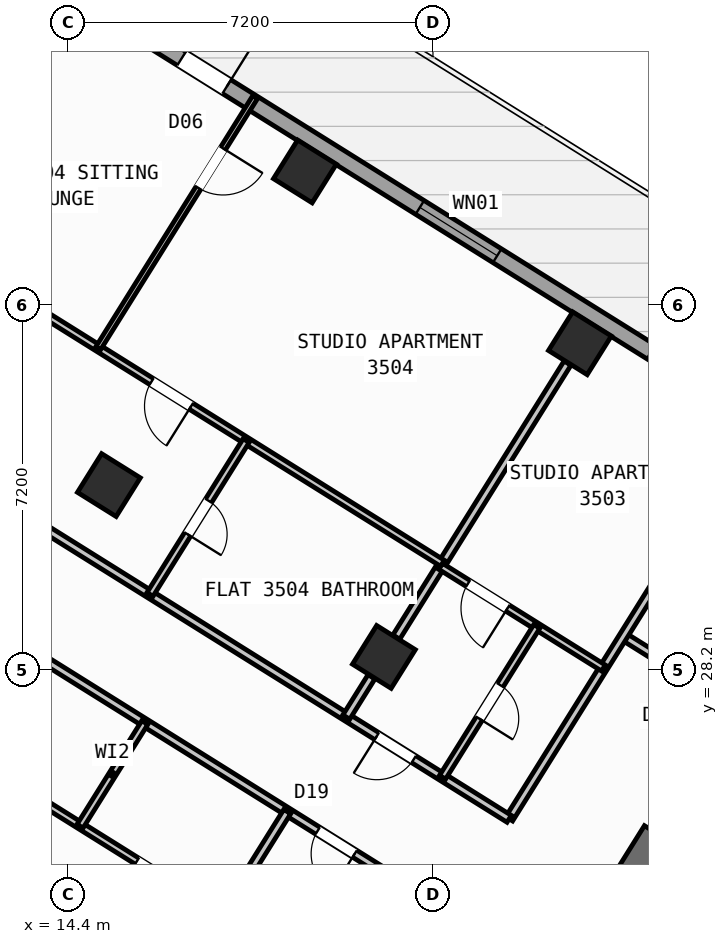
"""IFC4 building model, lengths in metres.
Left out: names, types, materials, properties, quantities, classifications, styles, units other than length and angle.
Written with IfcOpenShell. Run it as: python <this file> out.ifc"""

import sys

from ifc_helpers import new_model, si_unit, direction, frame, frame_2d, origin, origin_2d, place, context, subcontext, project, spatial, rectangle, hollow_rectangle, extrude, source, transform, mapped, element, fill, save


model = new_model("IFC4")
c1 = context("Model", 3, precision=1e-05, world=origin(), true_north=direction((0.0, 1.0)))
c2 = subcontext(c1, "Body", "Model", "MODEL_VIEW")
j1 = project(units=[si_unit("LENGTHUNIT", "METRE"), si_unit("PLANEANGLEUNIT", "RADIAN")], contexts=[c1])
p1 = place(None, origin())
s1 = spatial("IfcSite", under=j1, at=p1, CompositionType="ELEMENT")
p2 = place(p1, origin())
s2 = spatial("IfcBuilding", under=s1, at=p2, CompositionType="ELEMENT")
p3 = place(p2, frame((0.0, 0.0, 140.7)))
s3 = spatial("IfcBuildingStorey", under=s2, at=p3, CompositionType="ELEMENT", Elevation=140.7)
p4 = place(p3, frame((26.007, 24.976, 0.0), z_axis=(0.0, 0.0, 1.0), x_axis=(-0.529923795287, -0.848045264823, 0.0)))
e1 = element("IfcWall", 1, at=p4, inside=s3, PredefinedType="SHEAR", context=c2, shape_type="SweptSolid", body=[
    extrude(rectangle(XDim=6.425, YDim=0.55, at=frame_2d((3.212, 0.0))), origin(), (0.0, 0.0, 1.0), 3.35),
])
m1 = source(origin(), c2, "Body", "SweptSolid", [
    extrude(hollow_rectangle(XDim=0.9, YDim=0.9, WallThickness=0.036, at=origin_2d()), origin(), (0.0, 0.0, 1.0), 3.6),
])
for number, where, z_axis, x_axis in (
    (2, (24.5, 34.643, 0.0), (0.0, 0.0, 1.0), (-0.848, 0.53, 0.0)),
    (3, (20.632, 28.452, 0.0), (0.0, 0.0, 1.0), (-0.848, 0.53, 0.0)),
    (4, (19.073, 38.034, 0.0), (0.0, 0.0, 1.0), (-0.848, 0.53, 0.0)),
    (5, (15.205, 31.844, 0.0), (0.0, 0.0, 1.0), (-0.848, 0.53, 0.0)),
):
    element("IfcColumn", number, at=place(p3, frame(where, z_axis=z_axis, x_axis=x_axis)), inside=s3, PredefinedType="COLUMN", context=c2, shape_type="MappedRepresentation", body=[
        mapped(m1, transform((0.0, 0.0, 0.0), scale=1.0)),
    ])
p5 = place(p3, frame((14.138, 41.825, 0.0), z_axis=(0.0, 0.0, 1.0), x_axis=(0.848046498049, -0.529921821731, 0.0)))
e6 = element("IfcWall", 6, at=p5, inside=s3, PredefinedType="STANDARD", context=c2, shape_type="SweptSolid", body=[
    extrude(rectangle(XDim=31.588, YDim=0.32, at=frame_2d((15.794, 0.0))), origin(), (0.0, 0.0, 1.0), 3.35),
])
p6 = place(p5, frame((2.949, 0.0, 0.0)))
e7 = element("IfcOpeningElement", 7, at=p6, cuts=e6, PredefinedType="OPENING", context=c2, shape_type="SweptSolid", body=[
    extrude(rectangle(XDim=1.05, YDim=2.15, at=frame_2d((0.525, 1.075))), frame((0.0, 0.17, 0.0), z_axis=(0.0, -1.0, 0.0), x_axis=(1.0, 0.0, 0.0)), (0.0, 0.0, 1.0), 0.34),
])
p7 = place(p5, frame((0.861, 0.0, 0.85)))
e8 = element("IfcOpeningElement", 8, at=p7, cuts=e6, PredefinedType="OPENING", context=c2, shape_type="SweptSolid", body=[
    extrude(rectangle(XDim=1.5, YDim=1.5, at=frame_2d((0.75, 0.75))), frame((0.0, 0.17, 0.0), z_axis=(0.0, -1.0, 0.0), x_axis=(1.0, 0.0, 0.0)), (0.0, 0.0, 1.0), 0.34),
])
p8 = place(p5, frame((8.494, 0.0, 0.85)))
e9 = element("IfcOpeningElement", 9, at=p8, cuts=e6, PredefinedType="OPENING", context=c2, shape_type="SweptSolid", body=[
    extrude(rectangle(XDim=1.8, YDim=1.5, at=frame_2d((0.9, 0.75))), frame((0.0, 0.17, 0.0), z_axis=(0.0, -1.0, 0.0), x_axis=(1.0, 0.0, 0.0)), (0.0, 0.0, 1.0), 0.34),
])
p9 = place(p5, frame((13.874, 0.0, 0.85)))
e10 = element("IfcOpeningElement", 10, at=p9, cuts=e6, PredefinedType="OPENING", context=c2, shape_type="SweptSolid", body=[
    extrude(rectangle(XDim=1.5, YDim=1.5, at=frame_2d((0.75, 0.75))), frame((0.0, 0.17, 0.0), z_axis=(0.0, -1.0, 0.0), x_axis=(1.0, 0.0, 0.0)), (0.0, 0.0, 1.0), 0.34),
])
p10 = place(p5, frame((17.104, 0.0, 1.0)))
e11 = element("IfcOpeningElement", 11, at=p10, cuts=e6, PredefinedType="OPENING", context=c2, shape_type="SweptSolid", body=[
    extrude(rectangle(XDim=0.9, YDim=1.25, at=frame_2d((0.45, 0.625))), frame((0.0, 0.17, 0.0), z_axis=(0.0, -1.0, 0.0), x_axis=(1.0, 0.0, 0.0)), (0.0, 0.0, 1.0), 0.34),
])
p11 = place(p5, frame((22.144, 0.0, 1.0)))
e12 = element("IfcOpeningElement", 12, at=p11, cuts=e6, PredefinedType="OPENING", context=c2, shape_type="SweptSolid", body=[
    extrude(rectangle(XDim=0.9, YDim=1.25, at=frame_2d((0.45, 0.625))), frame((0.0, 0.17, 0.0), z_axis=(0.0, -1.0, 0.0), x_axis=(1.0, 0.0, 0.0)), (0.0, 0.0, 1.0), 0.34),
])
p12 = place(p5, frame((27.744, 0.0, 1.0)))
e13 = element("IfcOpeningElement", 13, at=p12, cuts=e6, PredefinedType="OPENING", context=c2, shape_type="SweptSolid", body=[
    extrude(rectangle(XDim=0.9, YDim=1.25, at=frame_2d((0.45, 0.625))), frame((0.0, 0.17, 0.0), z_axis=(0.0, -1.0, 0.0), x_axis=(1.0, 0.0, 0.0)), (0.0, 0.0, 1.0), 0.34),
])
p13 = place(p3, frame((27.57, 27.478, 0.0), z_axis=(0.0, 0.0, 1.0), x_axis=(-0.848050851465, 0.529914854792, 0.0)))
e14 = element("IfcWall", 14, at=p13, inside=s3, PredefinedType="PARTITIONING", context=c2, shape_type="SweptSolid", body=[
    extrude(rectangle(XDim=2.61, YDim=0.16, at=frame_2d((1.305, 0.0))), origin(), (0.0, 0.0, 1.0), 3.34),
])
p14 = place(p13, frame((0.95, 0.0, 0.0)))
e15 = element("IfcOpeningElement", 15, at=p14, cuts=e14, PredefinedType="OPENING", context=c2, shape_type="SweptSolid", body=[
    extrude(rectangle(XDim=0.86, YDim=2.05, at=frame_2d((0.43, 1.025))), frame((0.0, 0.09, 0.0), z_axis=(0.0, -1.0, 0.0), x_axis=(1.0, 0.0, 0.0)), (0.0, 0.0, 1.0), 0.18),
])
p15 = place(p3, frame((27.953, 33.016, 0.0), z_axis=(0.0, 0.0, 1.0), x_axis=(-0.529903001606, -0.848058257957, 0.0)))
e16 = element("IfcWall", 16, at=p15, inside=s3, PredefinedType="PARTITIONING", context=c2, shape_type="SweptSolid", body=[
    extrude(rectangle(XDim=9.15, YDim=0.16, at=frame_2d((4.575, 0.0))), origin(), (0.0, 0.0, 1.0), 3.34),
])
p16 = place(p3, frame((23.104, 25.256, 0.0), z_axis=(0.0, 0.0, 1.0), x_axis=(-0.848041752158, 0.529929416617, 0.0)))
e17 = element("IfcWall", 17, at=p16, inside=s3, PredefinedType="PARTITIONING", context=c2, shape_type="SweptSolid", body=[
    extrude(rectangle(XDim=16.73, YDim=0.16, at=frame_2d((8.365, 0.0))), origin(), (0.0, 0.0, 1.0), 3.34),
])
p17 = place(p16, frame((2.22, 0.0, 0.0)))
e18 = element("IfcOpeningElement", 18, at=p17, cuts=e17, PredefinedType="OPENING", context=c2, shape_type="SweptSolid", body=[
    extrude(rectangle(XDim=0.86, YDim=2.05, at=frame_2d((0.43, 1.025))), frame((0.0, 0.09, 0.0), z_axis=(0.0, -1.0, 0.0), x_axis=(1.0, 0.0, 0.0)), (0.0, 0.0, 1.0), 0.18),
])
p18 = place(p16, frame((12.084, 0.0, 0.0)))
e19 = element("IfcOpeningElement", 19, at=p18, cuts=e17, PredefinedType="OPENING", context=c2, shape_type="SweptSolid", body=[
    extrude(rectangle(XDim=1.0, YDim=2.1, at=frame_2d((0.5, 1.05))), frame((0.0, 0.09, 0.0), z_axis=(0.0, -1.0, 0.0), x_axis=(1.0, 0.0, 0.0)), (0.0, 0.0, 1.0), 0.18),
])
p19 = place(p3, frame((21.938, 23.391, 0.0), z_axis=(0.0, 0.0, 1.0), x_axis=(-0.848045850158, 0.529922858565, 0.0)))
e20 = element("IfcWall", 20, at=p19, inside=s3, PredefinedType="PARTITIONING", context=c2, shape_type="SweptSolid", body=[
    extrude(rectangle(XDim=16.73, YDim=0.16, at=frame_2d((8.365, 0.0))), origin(), (0.0, 0.0, 1.0), 3.34),
])
p20 = place(p19, frame((2.22, 0.0, 0.0)))
e21 = element("IfcOpeningElement", 21, at=p20, cuts=e20, PredefinedType="OPENING", context=c2, shape_type="SweptSolid", body=[
    extrude(rectangle(XDim=0.86, YDim=2.05, at=frame_2d((0.43, 1.025))), frame((0.0, 0.09, 0.0), z_axis=(0.0, -1.0, 0.0), x_axis=(1.0, 0.0, 0.0)), (0.0, 0.0, 1.0), 0.18),
])
p21 = place(p19, frame((14.22, 0.0, 0.0)))
e22 = element("IfcOpeningElement", 22, at=p21, cuts=e20, PredefinedType="OPENING", context=c2, shape_type="SweptSolid", body=[
    extrude(rectangle(XDim=1.0, YDim=2.1, at=frame_2d((0.5, 1.05))), frame((0.0, 0.09, 0.0), z_axis=(0.0, -1.0, 0.0), x_axis=(1.0, 0.0, 0.0)), (0.0, 0.0, 1.0), 0.18),
])
p22 = place(p3, frame((18.724, 25.399, 0.0), z_axis=(0.0, 0.0, 1.0), x_axis=(-0.529890499457, -0.848066069705, 0.0)))
e23 = element("IfcWall", 23, at=p22, inside=s3, PredefinedType="PARTITIONING", context=c2, shape_type="SweptSolid", body=[
    extrude(rectangle(XDim=3.238, YDim=0.16, at=frame_2d((1.619, 0.0))), origin(), (0.0, 0.0, 1.0), 2.775),
])
p23 = place(p3, frame((17.452, 23.364, 0.0), z_axis=(0.0, 0.0, 1.0), x_axis=(-0.848044326704, 0.52992529657, 0.0)))
e24 = element("IfcWall", 24, at=p23, inside=s3, PredefinedType="PLUMBINGWALL", context=c2, shape_type="SweptSolid", body=[
    extrude(rectangle(XDim=8.94, YDim=0.14, at=frame_2d((4.47, 0.0))), origin(), (0.0, 0.0, 1.0), 3.34),
])
p24 = place(p23, frame((5.087, 0.0, 0.0)))
e25 = element("IfcOpeningElement", 25, at=p24, cuts=e24, PredefinedType="OPENING", context=c2, shape_type="SweptSolid", body=[
    extrude(rectangle(XDim=0.78, YDim=2.05, at=frame_2d((0.39, 1.025))), frame((0.0, 0.08, 0.0), z_axis=(0.0, -1.0, 0.0), x_axis=(1.0, 0.0, 0.0)), (0.0, 0.0, 1.0), 0.16),
])
p25 = place(p23, frame((1.218, 0.0, 0.0)))
e26 = element("IfcOpeningElement", 26, at=p25, cuts=e24, PredefinedType="OPENING", context=c2, shape_type="SweptSolid", body=[
    extrude(rectangle(XDim=0.78, YDim=2.05, at=frame_2d((0.39, 1.025))), frame((0.0, 0.08, 0.0), z_axis=(0.0, -1.0, 0.0), x_axis=(1.0, 0.0, 0.0)), (0.0, 0.0, 1.0), 0.16),
])
p26 = place(p3, frame((15.913, 27.156, 0.0), z_axis=(0.0, 0.0, 1.0), x_axis=(-0.529935194983, -0.848038141311, 0.0)))
e27 = element("IfcWall", 27, at=p26, inside=s3, PredefinedType="PLUMBINGWALL", context=c2, shape_type="SweptSolid", body=[
    extrude(rectangle(XDim=2.41, YDim=0.14, at=frame_2d((1.205, 0.0))), origin(), (0.0, 0.0, 1.0), 3.34),
])
p27 = place(p3, frame((16.403, 21.685, 0.0), z_axis=(0.0, 0.0, 1.0), x_axis=(-0.848044326704, 0.52992529657, 0.0)))
e28 = element("IfcWall", 28, at=p27, inside=s3, PredefinedType="PARTITIONING", context=c2, shape_type="SweptSolid", body=[
    extrude(rectangle(XDim=8.94, YDim=0.11, at=frame_2d((4.47, 0.0))), origin(), (0.0, 0.0, 1.0), 3.34),
])
p28 = place(p27, frame((0.657, 0.0, 0.0)))
e29 = element("IfcOpeningElement", 29, at=p28, cuts=e28, PredefinedType="OPENING", context=c2, shape_type="SweptSolid", body=[
    extrude(rectangle(XDim=0.92, YDim=2.08, at=frame_2d((0.46, 1.04))), frame((0.0, 0.065, 0.0), z_axis=(0.0, -1.0, 0.0), x_axis=(1.0, 0.0, 0.0)), (0.0, 0.0, 1.0), 0.13),
])
p29 = place(p27, frame((2.893, 0.0, 0.0)))
e30 = element("IfcOpeningElement", 30, at=p29, cuts=e28, PredefinedType="OPENING", context=c2, shape_type="SweptSolid", body=[
    extrude(rectangle(XDim=0.92, YDim=2.08, at=frame_2d((0.46, 1.04))), frame((0.0, 0.065, 0.0), z_axis=(0.0, -1.0, 0.0), x_axis=(1.0, 0.0, 0.0)), (0.0, 0.0, 1.0), 0.13),
])
p30 = place(p27, frame((5.008, 0.0, 0.0)))
e31 = element("IfcOpeningElement", 31, at=p30, cuts=e28, PredefinedType="OPENING", context=c2, shape_type="SweptSolid", body=[
    extrude(rectangle(XDim=0.92, YDim=2.08, at=frame_2d((0.46, 1.04))), frame((0.0, 0.065, 0.0), z_axis=(0.0, -1.0, 0.0), x_axis=(1.0, 0.0, 0.0)), (0.0, 0.0, 1.0), 0.13),
])
p31 = place(p27, frame((7.363, 0.0, 0.0)))
e32 = element("IfcOpeningElement", 32, at=p31, cuts=e28, PredefinedType="OPENING", context=c2, shape_type="SweptSolid", body=[
    extrude(rectangle(XDim=0.92, YDim=2.08, at=frame_2d((0.46, 1.04))), frame((0.0, 0.065, 0.0), z_axis=(0.0, -1.0, 0.0), x_axis=(1.0, 0.0, 0.0)), (0.0, 0.0, 1.0), 0.13),
])
p32 = place(p3, frame((24.256, 34.251, 0.0), z_axis=(0.0, 0.0, 1.0), x_axis=(-0.529919772691, -0.848047778437, 0.0)))
e33 = element("IfcWall", 33, at=p32, inside=s3, PredefinedType="PARTITIONING", context=c2, shape_type="SweptSolid", body=[
    extrude(rectangle(XDim=6.376, YDim=0.16, at=frame_2d((3.188, 0.0))), origin(), (0.0, 0.0, 1.0), 2.775),
])
p33 = place(p3, frame((20.387, 28.06, 0.0), z_axis=(0.0, 0.0, 1.0), x_axis=(-0.529952145338, -0.848027548876, 0.0)))
e34 = element("IfcWall", 34, at=p33, inside=s3, PredefinedType="PARTITIONING", context=c2, shape_type="SweptSolid", body=[
    extrude(rectangle(XDim=0.938, YDim=0.16, at=frame_2d((0.469, 0.0))), origin(), (0.0, 0.0, 1.0), 2.775),
])
p34 = place(p3, frame((24.964, 28.233, 0.0), z_axis=(0.0, 0.0, 1.0), x_axis=(-0.848059820872, 0.529900500304, 0.0)))
e35 = element("IfcWall", 35, at=p34, inside=s3, PredefinedType="PLUMBINGWALL", context=c2, shape_type="SweptSolid", body=[
    extrude(rectangle(XDim=3.79, YDim=0.14, at=frame_2d((1.895, 0.0))), origin(), (0.0, 0.0, 1.0), 3.34),
])
p35 = place(p34, frame((2.23, 0.0, 0.0)))
e36 = element("IfcOpeningElement", 36, at=p35, cuts=e35, PredefinedType="OPENING", context=c2, shape_type="SweptSolid", body=[
    extrude(rectangle(XDim=0.92, YDim=2.08, at=frame_2d((0.46, 1.04))), frame((0.0, 0.08, 0.0), z_axis=(0.0, -1.0, 0.0), x_axis=(1.0, 0.0, 0.0)), (0.0, 0.0, 1.0), 0.16),
])
p36 = place(p3, frame((23.65, 29.054, 0.0), z_axis=(0.0, 0.0, 1.0), x_axis=(-0.529898896701, -0.848060822863, 0.0)))
e37 = element("IfcWall", 37, at=p36, inside=s3, PredefinedType="PLUMBINGWALL", context=c2, shape_type="SweptSolid", body=[
    extrude(rectangle(XDim=3.51, YDim=0.14, at=frame_2d((1.755, 0.0))), origin(), (0.0, 0.0, 1.0), 2.995),
])
p37 = place(p36, frame((1.365, 0.0, 0.0)))
e38 = element("IfcOpeningElement", 38, at=p37, cuts=e37, PredefinedType="OPENING", context=c2, shape_type="SweptSolid", body=[
    extrude(rectangle(XDim=0.78, YDim=2.05, at=frame_2d((0.39, 1.025))), frame((0.0, 0.08, 0.0), z_axis=(0.0, -1.0, 0.0), x_axis=(1.0, 0.0, 0.0)), (0.0, 0.0, 1.0), 0.16),
])
p38 = place(p3, frame((21.787, 30.301, 0.0), z_axis=(0.0, 0.0, 1.0), x_axis=(-0.848043949058, 0.52992590092, 0.0)))
e39 = element("IfcWall", 39, at=p38, inside=s3, PredefinedType="PLUMBINGWALL", context=c2, shape_type="SweptSolid", body=[
    extrude(rectangle(XDim=12.92, YDim=0.14, at=frame_2d((6.46, 0.0))), origin(), (0.0, 0.0, 1.0), 3.34),
])
p39 = place(p38, frame((5.849, 0.0, 0.0)))
e40 = element("IfcOpeningElement", 40, at=p39, cuts=e39, PredefinedType="OPENING", context=c2, shape_type="SweptSolid", body=[
    extrude(rectangle(XDim=0.92, YDim=2.08, at=frame_2d((0.46, 1.04))), frame((0.0, 0.08, 0.0), z_axis=(0.0, -1.0, 0.0), x_axis=(1.0, 0.0, 0.0)), (0.0, 0.0, 1.0), 0.16),
])
p40 = place(p3, frame((17.913, 32.721, 0.0), z_axis=(0.0, 0.0, 1.0), x_axis=(-0.529906983049, -0.848055770169, 0.0)))
e41 = element("IfcWall", 41, at=p40, inside=s3, PredefinedType="PLUMBINGWALL", context=c2, shape_type="SweptSolid", body=[
    extrude(rectangle(XDim=3.58, YDim=0.14, at=frame_2d((1.79, 0.0))), origin(), (0.0, 0.0, 1.0), 3.34),
])
p41 = place(p40, frame((1.4, 0.0, 0.0)))
e42 = element("IfcOpeningElement", 42, at=p41, cuts=e41, PredefinedType="OPENING", context=c2, shape_type="SweptSolid", body=[
    extrude(rectangle(XDim=0.78, YDim=2.05, at=frame_2d((0.39, 1.025))), frame((0.0, 0.08, 0.0), z_axis=(0.0, -1.0, 0.0), x_axis=(1.0, 0.0, 0.0)), (0.0, 0.0, 1.0), 0.16),
])
p42 = place(p3, frame((18.089, 39.498, 0.0), z_axis=(0.0, 0.0, 1.0), x_axis=(-0.529916267533, -0.848049968695, 0.0)))
e43 = element("IfcWall", 43, at=p42, inside=s3, PredefinedType="PARTITIONING", context=c2, shape_type="SweptSolid", body=[
    extrude(rectangle(XDim=5.84, YDim=0.11, at=frame_2d((2.92, 0.0))), origin(), (0.0, 0.0, 1.0), 3.34),
])
p43 = place(p42, frame((1.19, 0.0, 0.0)))
e44 = element("IfcOpeningElement", 44, at=p43, cuts=e43, PredefinedType="OPENING", context=c2, shape_type="SweptSolid", body=[
    extrude(rectangle(XDim=0.92, YDim=2.08, at=frame_2d((0.46, 1.04))), frame((0.0, 0.065, 0.0), z_axis=(0.0, -1.0, 0.0), x_axis=(1.0, 0.0, 0.0)), (0.0, 0.0, 1.0), 0.13),
])
m2 = source(origin(), c2, "Body", "SweptSolid", [
    extrude(rectangle(XDim=1.05, YDim=2.15, at=frame_2d((0.525, 1.075))), frame((0.0, 0.025, 0.0), z_axis=(0.0, -1.0, 0.0), x_axis=(1.0, 0.0, 0.0)), (0.0, 0.0, 1.0), 0.05),
])
p44 = place(p6, origin())
e45 = element("IfcDoor", 45, at=p44, inside=s3, OperationType="SINGLE_SWING_RIGHT", PredefinedType="DOOR", context=c2, shape_type="MappedRepresentation", body=[
    mapped(m2, transform((0.0, 0.0, 0.0), scale=1.0)),
])
fill(e7, e45)
m3 = source(origin(), c2, "Body", "SweptSolid", [
    extrude(rectangle(XDim=1.8, YDim=1.5, at=frame_2d((0.9, 0.75))), frame((0.0, 0.03, 0.0), z_axis=(0.0, -1.0, 0.0), x_axis=(1.0, 0.0, 0.0)), (0.0, 0.0, 1.0), 0.06),
])
p45 = place(p8, origin())
e46 = element("IfcWindow", 46, at=p45, inside=s3, PartitioningType="SINGLE_PANEL", PredefinedType="WINDOW", context=c2, shape_type="MappedRepresentation", body=[
    mapped(m3, transform((0.0, 0.0, 0.0), scale=1.0)),
])
fill(e9, e46)
m4 = source(origin(), c2, "Body", "SweptSolid", [
    extrude(rectangle(XDim=0.86, YDim=2.05, at=frame_2d((0.43, 1.025))), frame((0.0, 0.025, 0.0), z_axis=(0.0, -1.0, 0.0), x_axis=(1.0, 0.0, 0.0)), (0.0, 0.0, 1.0), 0.05),
])
p46 = place(p20, origin())
e47 = element("IfcDoor", 47, at=p46, inside=s3, OperationType="SINGLE_SWING_LEFT", PredefinedType="DOOR", context=c2, shape_type="MappedRepresentation", body=[
    mapped(m4, transform((0.0, 0.0, 0.0), scale=1.0)),
])
fill(e21, e47)
m5 = source(origin(), c2, "Body", "SweptSolid", [
    extrude(rectangle(XDim=0.78, YDim=2.05, at=frame_2d((0.39, 1.025))), frame((0.0, 0.025, 0.0), z_axis=(0.0, -1.0, 0.0), x_axis=(1.0, 0.0, 0.0)), (0.0, 0.0, 1.0), 0.05),
])
p47 = place(p25, origin())
e48 = element("IfcDoor", 48, at=p47, inside=s3, OperationType="SINGLE_SWING_LEFT", PredefinedType="DOOR", context=c2, shape_type="MappedRepresentation", body=[
    mapped(m5, transform((0.0, 0.0, 0.0), scale=1.0)),
])
fill(e26, e48)
p48 = place(p17, origin())
e49 = element("IfcDoor", 49, at=p48, inside=s3, OperationType="SINGLE_SWING_RIGHT", PredefinedType="DOOR", context=c2, shape_type="MappedRepresentation", body=[
    mapped(m4, transform((0.0, 0.0, 0.0), scale=1.0)),
])
fill(e18, e49)
m6 = source(origin(), c2, "Body", "SweptSolid", [
    extrude(rectangle(XDim=0.92, YDim=2.08, at=frame_2d((0.46, 1.04))), frame((0.0, 0.025, 0.0), z_axis=(0.0, -1.0, 0.0), x_axis=(1.0, 0.0, 0.0)), (0.0, 0.0, 1.0), 0.05),
])
p49 = place(p35, origin())
e50 = element("IfcDoor", 50, at=p49, inside=s3, OperationType="SINGLE_SWING_LEFT", PredefinedType="DOOR", context=c2, shape_type="MappedRepresentation", body=[
    mapped(m6, transform((0.0, 0.0, 0.0), scale=1.0)),
])
fill(e36, e50)
p50 = place(p37, origin())
e51 = element("IfcDoor", 51, at=p50, inside=s3, OperationType="SINGLE_SWING_RIGHT", PredefinedType="DOOR", context=c2, shape_type="MappedRepresentation", body=[
    mapped(m5, transform((0.0, 0.0, 0.0), scale=1.0)),
])
fill(e38, e51)
p51 = place(p43, origin())
e52 = element("IfcDoor", 52, at=p51, inside=s3, OperationType="SINGLE_SWING_LEFT", PredefinedType="DOOR", context=c2, shape_type="MappedRepresentation", body=[
    mapped(m6, transform((0.0, 0.0, 0.0), scale=1.0)),
])
fill(e44, e52)
p52 = place(p39, origin())
e53 = element("IfcDoor", 53, at=p52, inside=s3, OperationType="SINGLE_SWING_LEFT", PredefinedType="DOOR", context=c2, shape_type="MappedRepresentation", body=[
    mapped(m6, transform((0.0, 0.0, 0.0), scale=1.0)),
])
fill(e40, e53)
p53 = place(p41, origin())
e54 = element("IfcDoor", 54, at=p53, inside=s3, OperationType="SINGLE_SWING_RIGHT", PredefinedType="DOOR", context=c2, shape_type="MappedRepresentation", body=[
    mapped(m5, transform((0.0, 0.0, 0.0), scale=1.0)),
])
fill(e42, e54)
save(model, sys.argv[1])
